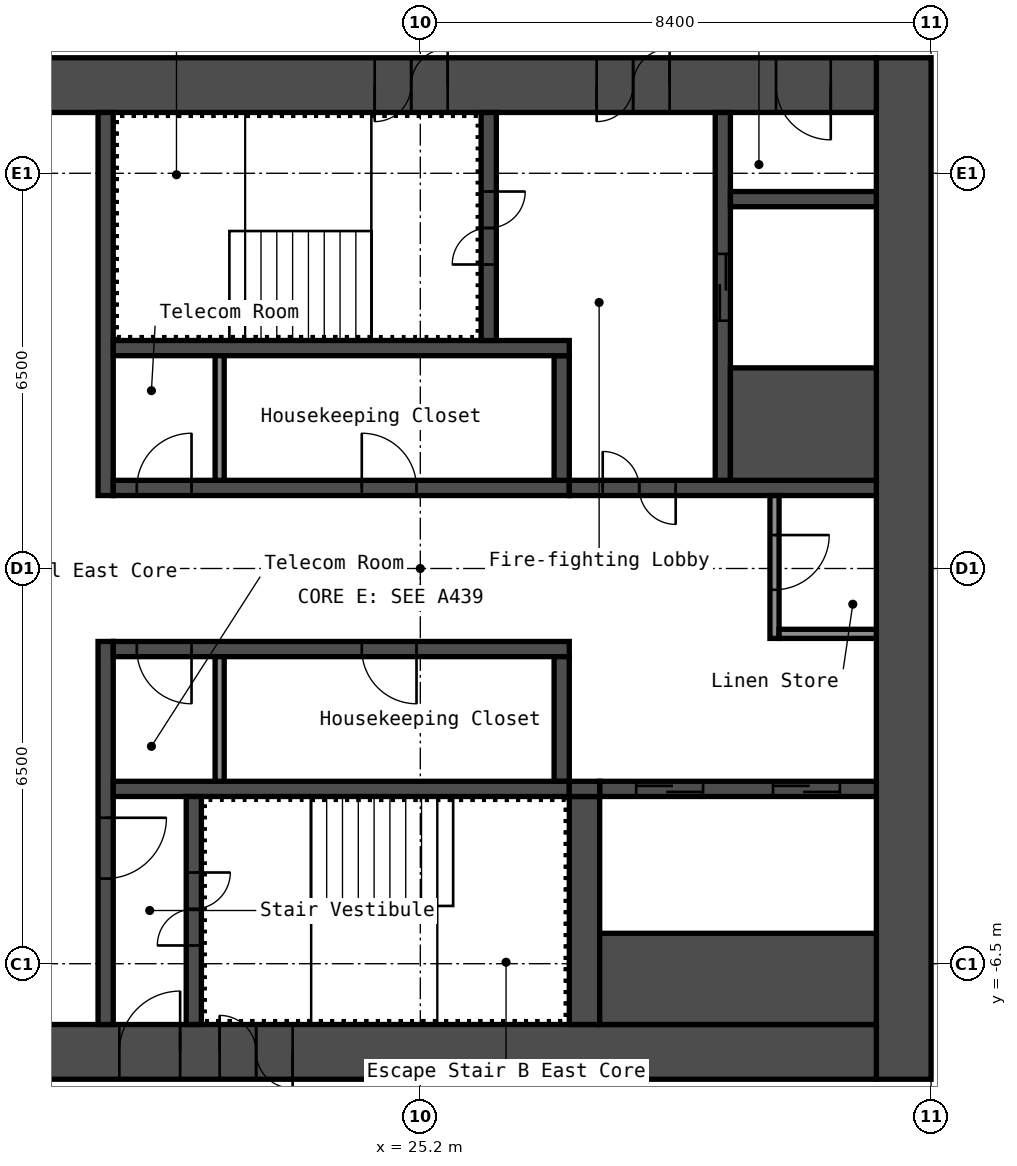
"""IFC4 building model, lengths in metres.
Left out: names, types, materials, properties, quantities, classifications, styles, units other than length and angle.
Written with IfcOpenShell. Run it as: python <this file> out.ifc"""

import sys

from ifc_helpers import new_model, si_unit, direction, frame, frame_2d, origin, place, context, subcontext, project, spatial, rectangle, extrude, element, fill, save


model = new_model("IFC4")
c1 = context("Model", 3, precision=1e-05, world=origin(), true_north=direction((0.0, 1.0)))
c2 = subcontext(c1, "Body", "Model", "MODEL_VIEW")
j1 = project(units=[si_unit("LENGTHUNIT", "METRE"), si_unit("PLANEANGLEUNIT", "RADIAN")], contexts=[c1])
p1 = place(None, origin())
s1 = spatial("IfcSite", under=j1, at=p1, CompositionType="ELEMENT")
p2 = place(p1, origin())
s2 = spatial("IfcBuilding", under=s1, at=p2, CompositionType="ELEMENT")
p3 = place(p2, frame((0.0, 0.0, 270.6)))
s3 = spatial("IfcBuildingStorey", under=s2, at=p3, CompositionType="ELEMENT", Elevation=270.6)
p4 = place(p3, frame((33.15, -8.4, 0.0), z_axis=(0.0, 0.0, 1.0), x_axis=(0.0, 1.0, 0.0)))
e1 = element("IfcWall", 1, at=p4, inside=s3, PredefinedType="SHEAR", context=c2, shape_type="SweptSolid", body=[
    extrude(rectangle(XDim=16.8, YDim=0.9, at=frame_2d((8.4, 0.0))), origin(), (0.0, 0.0, 1.0), 5.55),
])
p5 = place(p3, frame((17.7, 7.95, 0.0), z_axis=(0.0, 0.0, 1.0), x_axis=(1.0, 0.0, 0.0)))
e2 = element("IfcWall", 2, at=p5, inside=s3, PredefinedType="SHEAR", context=c2, shape_type="SweptSolid", body=[
    extrude(rectangle(XDim=15.0, YDim=0.9, at=frame_2d((7.5, 0.0))), origin(), (0.0, 0.0, 1.0), 5.55),
])
p6 = place(p5, frame((10.4, 0.0, 0.0)))
e3 = element("IfcOpeningElement", 3, at=p6, cuts=e2, PredefinedType="OPENING", context=c2, shape_type="SweptSolid", body=[
    extrude(rectangle(XDim=1.2, YDim=2.1, at=frame_2d((0.6, 1.05))), frame((0.0, 0.46, 0.0), z_axis=(0.0, -1.0, 0.0), x_axis=(1.0, 0.0, 0.0)), (0.0, 0.0, 1.0), 0.92),
])
p7 = place(p5, frame((13.35, 0.0, 0.0)))
e4 = element("IfcOpeningElement", 4, at=p7, cuts=e2, PredefinedType="OPENING", context=c2, shape_type="SweptSolid", body=[
    extrude(rectangle(XDim=0.9, YDim=2.1, at=frame_2d((0.45, 1.05))), frame((0.0, 0.46, 0.0), z_axis=(0.0, -1.0, 0.0), x_axis=(1.0, 0.0, 0.0)), (0.0, 0.0, 1.0), 0.92),
])
p8 = place(p5, frame((6.75, 0.0, 0.0)))
e5 = element("IfcOpeningElement", 5, at=p8, cuts=e2, PredefinedType="OPENING", context=c2, shape_type="SweptSolid", body=[
    extrude(rectangle(XDim=1.2, YDim=2.1, at=frame_2d((0.6, 1.05))), frame((0.0, 0.46, 0.0), z_axis=(0.0, -1.0, 0.0), x_axis=(1.0, 0.0, 0.0)), (0.0, 0.0, 1.0), 0.92),
])
p9 = place(p3, frame((17.7, -7.95, 0.0), z_axis=(0.0, 0.0, 1.0), x_axis=(1.0, 0.0, 0.0)))
e6 = element("IfcWall", 6, at=p9, inside=s3, PredefinedType="SHEAR", context=c2, shape_type="SweptSolid", body=[
    extrude(rectangle(XDim=15.0, YDim=0.9, at=frame_2d((7.5, 0.0))), origin(), (0.0, 0.0, 1.0), 5.55),
])
p10 = place(p9, frame((2.55, 0.0, 0.0)))
e7 = element("IfcOpeningElement", 7, at=p10, cuts=e6, PredefinedType="OPENING", context=c2, shape_type="SweptSolid", body=[
    extrude(rectangle(XDim=1.0, YDim=2.1, at=frame_2d((0.5, 1.05))), frame((0.0, 0.46, 0.0), z_axis=(0.0, -1.0, 0.0), x_axis=(1.0, 0.0, 0.0)), (0.0, 0.0, 1.0), 0.92),
])
p11 = place(p9, frame((4.2, 0.0, 0.0)))
e8 = element("IfcOpeningElement", 8, at=p11, cuts=e6, PredefinedType="OPENING", context=c2, shape_type="SweptSolid", body=[
    extrude(rectangle(XDim=1.2, YDim=2.1, at=frame_2d((0.6, 1.05))), frame((0.0, 0.46, 0.0), z_axis=(0.0, -1.0, 0.0), x_axis=(1.0, 0.0, 0.0)), (0.0, 0.0, 1.0), 0.92),
])
p12 = place(p3, frame((20.025, 1.2, 0.0), z_axis=(0.0, 0.0, 1.0), x_axis=(0.0, 1.0, 0.0)))
e9 = element("IfcWall", 9, at=p12, inside=s3, PredefinedType="SHEAR", context=c2, shape_type="SweptSolid", body=[
    extrude(rectangle(XDim=6.3, YDim=0.25, at=frame_2d((3.15, 0.0))), origin(), (0.0, 0.0, 1.0), 5.55),
])
p13 = place(p3, frame((20.025, -7.5, 0.0), z_axis=(0.0, 0.0, 1.0), x_axis=(0.0, 1.0, 0.0)))
e10 = element("IfcWall", 10, at=p13, inside=s3, PredefinedType="SHEAR", context=c2, shape_type="SweptSolid", body=[
    extrude(rectangle(XDim=6.3, YDim=0.25, at=frame_2d((3.15, 0.0))), origin(), (0.0, 0.0, 1.0), 5.55),
])
p14 = place(p13, frame((2.4, 0.0, 0.0)))
e11 = element("IfcOpeningElement", 11, at=p14, cuts=e10, PredefinedType="OPENING", context=c2, shape_type="SweptSolid", body=[
    extrude(rectangle(XDim=1.0, YDim=2.1, at=frame_2d((0.5, 1.05))), frame((0.0, 0.135, 0.0), z_axis=(0.0, -1.0, 0.0), x_axis=(1.0, 0.0, 0.0)), (0.0, 0.0, 1.0), 0.27),
])
p15 = place(p3, frame((20.15, 1.325, 0.0), z_axis=(0.0, 0.0, 1.0), x_axis=(1.0, 0.0, 0.0)))
e12 = element("IfcWall", 12, at=p15, inside=s3, PredefinedType="SHEAR", context=c2, shape_type="SweptSolid", body=[
    extrude(rectangle(XDim=7.5, YDim=0.25, at=frame_2d((3.75, 0.0))), origin(), (0.0, 0.0, 1.0), 5.55),
])
p16 = place(p15, frame((0.387, 0.0, 0.0)))
e13 = element("IfcOpeningElement", 13, at=p16, cuts=e12, PredefinedType="OPENING", context=c2, shape_type="SweptSolid", body=[
    extrude(rectangle(XDim=0.9, YDim=2.1, at=frame_2d((0.45, 1.05))), frame((0.0, 0.135, 0.0), z_axis=(0.0, -1.0, 0.0), x_axis=(1.0, 0.0, 0.0)), (0.0, 0.0, 1.0), 0.27),
])
p17 = place(p15, frame((4.087, 0.0, 0.0)))
e14 = element("IfcOpeningElement", 14, at=p17, cuts=e12, PredefinedType="OPENING", context=c2, shape_type="SweptSolid", body=[
    extrude(rectangle(XDim=0.9, YDim=2.1, at=frame_2d((0.45, 1.05))), frame((0.0, 0.135, 0.0), z_axis=(0.0, -1.0, 0.0), x_axis=(1.0, 0.0, 0.0)), (0.0, 0.0, 1.0), 0.27),
])
p18 = place(p3, frame((27.525, 1.45, 0.0), z_axis=(0.0, 0.0, 1.0), x_axis=(0.0, 1.0, 0.0)))
e15 = element("IfcWall", 15, at=p18, inside=s3, PredefinedType="SHEAR", context=c2, shape_type="SweptSolid", body=[
    extrude(rectangle(XDim=2.05, YDim=0.25, at=frame_2d((1.025, 0.0))), origin(), (0.0, 0.0, 1.0), 5.55),
])
p19 = place(p3, frame((20.15, 3.625, 0.0), z_axis=(0.0, 0.0, 1.0), x_axis=(1.0, 0.0, 0.0)))
e16 = element("IfcWall", 16, at=p19, inside=s3, PredefinedType="SHEAR", context=c2, shape_type="SweptSolid", body=[
    extrude(rectangle(XDim=7.5, YDim=0.25, at=frame_2d((3.75, 0.0))), origin(), (0.0, 0.0, 1.0), 5.55),
])
p20 = place(p3, frame((26.325, 3.75, 0.0), z_axis=(0.0, 0.0, 1.0), x_axis=(0.0, 1.0, 0.0)))
e17 = element("IfcWall", 17, at=p20, inside=s3, PredefinedType="SHEAR", context=c2, shape_type="SweptSolid", body=[
    extrude(rectangle(XDim=3.75, YDim=0.25, at=frame_2d((1.875, 0.0))), origin(), (0.0, 0.0, 1.0), 5.55),
])
p21 = place(p20, frame((1.25, 0.0, 0.0)))
e18 = element("IfcOpeningElement", 18, at=p21, cuts=e17, PredefinedType="OPENING", context=c2, shape_type="SweptSolid", body=[
    extrude(rectangle(XDim=1.2, YDim=2.1, at=frame_2d((0.6, 1.05))), frame((0.0, 0.135, 0.0), z_axis=(0.0, -1.0, 0.0), x_axis=(1.0, 0.0, 0.0)), (0.0, 0.0, 1.0), 0.27),
])
p22 = place(p3, frame((27.65, 1.325, 0.0), z_axis=(0.0, 0.0, 1.0), x_axis=(1.0, 0.0, 0.0)))
e19 = element("IfcWall", 19, at=p22, inside=s3, PredefinedType="SHEAR", context=c2, shape_type="SweptSolid", body=[
    extrude(rectangle(XDim=5.05, YDim=0.25, at=frame_2d((2.525, 0.0))), origin(), (0.0, 0.0, 1.0), 5.55),
])
p23 = place(p22, frame((0.55, 0.0, 0.0)))
e20 = element("IfcOpeningElement", 20, at=p23, cuts=e19, PredefinedType="OPENING", context=c2, shape_type="SweptSolid", body=[
    extrude(rectangle(XDim=1.2, YDim=2.1, at=frame_2d((0.6, 1.05))), frame((0.0, 0.135, 0.0), z_axis=(0.0, -1.0, 0.0), x_axis=(1.0, 0.0, 0.0)), (0.0, 0.0, 1.0), 0.27),
])
p24 = place(p3, frame((30.175, 1.45, 0.0), z_axis=(0.0, 0.0, 1.0), x_axis=(0.0, 1.0, 0.0)))
e21 = element("IfcWall", 21, at=p24, inside=s3, PredefinedType="SHEAR", context=c2, shape_type="SweptSolid", body=[
    extrude(rectangle(XDim=6.05, YDim=0.25, at=frame_2d((3.025, 0.0))), origin(), (0.0, 0.0, 1.0), 5.55),
])
p25 = place(p24, frame((2.625, 0.0, 0.0)))
e22 = element("IfcOpeningElement", 22, at=p25, cuts=e21, PredefinedType="OPENING", context=c2, shape_type="SweptSolid", body=[
    extrude(rectangle(XDim=1.1, YDim=2.1, at=frame_2d((0.55, 1.05))), frame((0.0, 0.135, 0.0), z_axis=(0.0, -1.0, 0.0), x_axis=(1.0, 0.0, 0.0)), (0.0, 0.0, 1.0), 0.27),
])
p26 = place(p3, frame((30.3, 2.375, 0.0), z_axis=(0.0, 0.0, 1.0), x_axis=(1.0, 0.0, 0.0)))
e23 = element("IfcWall", 23, at=p26, inside=s3, PredefinedType="SHEAR", context=c2, shape_type="SweptSolid", body=[
    extrude(rectangle(XDim=2.4, YDim=1.85, at=frame_2d((1.2, 0.0))), origin(), (0.0, 0.0, 1.0), 5.55),
])
p27 = place(p3, frame((30.3, 6.075, 0.0), z_axis=(0.0, 0.0, 1.0), x_axis=(1.0, 0.0, 0.0)))
e24 = element("IfcWall", 24, at=p27, inside=s3, PredefinedType="SHEAR", context=c2, shape_type="SweptSolid", body=[
    extrude(rectangle(XDim=2.4, YDim=0.25, at=frame_2d((1.2, 0.0))), origin(), (0.0, 0.0, 1.0), 5.55),
])
p28 = place(p3, frame((20.15, -1.325, 0.0), z_axis=(0.0, 0.0, 1.0), x_axis=(1.0, 0.0, 0.0)))
e25 = element("IfcWall", 25, at=p28, inside=s3, PredefinedType="SHEAR", context=c2, shape_type="SweptSolid", body=[
    extrude(rectangle(XDim=7.5, YDim=0.25, at=frame_2d((3.75, 0.0))), origin(), (0.0, 0.0, 1.0), 5.55),
])
p29 = place(p28, frame((0.387, 0.0, 0.0)))
e26 = element("IfcOpeningElement", 26, at=p29, cuts=e25, PredefinedType="OPENING", context=c2, shape_type="SweptSolid", body=[
    extrude(rectangle(XDim=0.9, YDim=2.1, at=frame_2d((0.45, 1.05))), frame((0.0, 0.135, 0.0), z_axis=(0.0, -1.0, 0.0), x_axis=(1.0, 0.0, 0.0)), (0.0, 0.0, 1.0), 0.27),
])
p30 = place(p28, frame((4.087, 0.0, 0.0)))
e27 = element("IfcOpeningElement", 27, at=p30, cuts=e25, PredefinedType="OPENING", context=c2, shape_type="SweptSolid", body=[
    extrude(rectangle(XDim=0.9, YDim=2.1, at=frame_2d((0.45, 1.05))), frame((0.0, 0.135, 0.0), z_axis=(0.0, -1.0, 0.0), x_axis=(1.0, 0.0, 0.0)), (0.0, 0.0, 1.0), 0.27),
])
p31 = place(p3, frame((27.525, -3.5, 0.0), z_axis=(0.0, 0.0, 1.0), x_axis=(0.0, 1.0, 0.0)))
e28 = element("IfcWall", 28, at=p31, inside=s3, PredefinedType="SHEAR", context=c2, shape_type="SweptSolid", body=[
    extrude(rectangle(XDim=2.05, YDim=0.25, at=frame_2d((1.025, 0.0))), origin(), (0.0, 0.0, 1.0), 5.55),
])
p32 = place(p3, frame((20.15, -3.625, 0.0), z_axis=(0.0, 0.0, 1.0), x_axis=(1.0, 0.0, 0.0)))
e29 = element("IfcWall", 29, at=p32, inside=s3, PredefinedType="SHEAR", context=c2, shape_type="SweptSolid", body=[
    extrude(rectangle(XDim=7.5, YDim=0.25, at=frame_2d((3.75, 0.0))), origin(), (0.0, 0.0, 1.0), 5.55),
])
p33 = place(p3, frame((21.475, -7.5, 0.0), z_axis=(0.0, 0.0, 1.0), x_axis=(0.0, 1.0, 0.0)))
e30 = element("IfcWall", 30, at=p33, inside=s3, PredefinedType="SHEAR", context=c2, shape_type="SweptSolid", body=[
    extrude(rectangle(XDim=3.75, YDim=0.25, at=frame_2d((1.875, 0.0))), origin(), (0.0, 0.0, 1.0), 5.55),
])
p34 = place(p33, frame((1.3, 0.0, 0.0)))
e31 = element("IfcOpeningElement", 31, at=p34, cuts=e30, PredefinedType="OPENING", context=c2, shape_type="SweptSolid", body=[
    extrude(rectangle(XDim=1.2, YDim=2.1, at=frame_2d((0.6, 1.05))), frame((0.0, 0.135, 0.0), z_axis=(0.0, -1.0, 0.0), x_axis=(1.0, 0.0, 0.0)), (0.0, 0.0, 1.0), 0.27),
])
p35 = place(p3, frame((27.9, -7.5, 0.0), z_axis=(0.0, 0.0, 1.0), x_axis=(0.0, 1.0, 0.0)))
e32 = element("IfcWall", 32, at=p35, inside=s3, PredefinedType="SHEAR", context=c2, shape_type="SweptSolid", body=[
    extrude(rectangle(XDim=3.75, YDim=0.5, at=frame_2d((1.875, 0.0))), origin(), (0.0, 0.0, 1.0), 5.55),
])
p36 = place(p3, frame((28.15, -3.625, 0.0), z_axis=(0.0, 0.0, 1.0), x_axis=(1.0, 0.0, 0.0)))
e33 = element("IfcWall", 33, at=p36, inside=s3, PredefinedType="SHEAR", context=c2, shape_type="SweptSolid", body=[
    extrude(rectangle(XDim=4.55, YDim=0.25, at=frame_2d((2.275, 0.0))), origin(), (0.0, 0.0, 1.0), 5.55),
])
p37 = place(p36, frame((0.6, 0.0, 0.0)))
e34 = element("IfcOpeningElement", 34, at=p37, cuts=e33, PredefinedType="OPENING", context=c2, shape_type="SweptSolid", body=[
    extrude(rectangle(XDim=1.1, YDim=2.1, at=frame_2d((0.55, 1.05))), frame((0.0, 0.135, 0.0), z_axis=(0.0, -1.0, 0.0), x_axis=(1.0, 0.0, 0.0)), (0.0, 0.0, 1.0), 0.27),
])
p38 = place(p36, frame((2.85, 0.0, 0.0)))
e35 = element("IfcOpeningElement", 35, at=p38, cuts=e33, PredefinedType="OPENING", context=c2, shape_type="SweptSolid", body=[
    extrude(rectangle(XDim=1.1, YDim=2.1, at=frame_2d((0.55, 1.05))), frame((0.0, 0.135, 0.0), z_axis=(0.0, -1.0, 0.0), x_axis=(1.0, 0.0, 0.0)), (0.0, 0.0, 1.0), 0.27),
])
p39 = place(p3, frame((28.15, -6.75, 0.0), z_axis=(0.0, 0.0, 1.0), x_axis=(1.0, 0.0, 0.0)))
e36 = element("IfcWall", 36, at=p39, inside=s3, PredefinedType="SHEAR", context=c2, shape_type="SweptSolid", body=[
    extrude(rectangle(XDim=4.55, YDim=1.5, at=frame_2d((2.275, 0.0))), origin(), (0.0, 0.0, 1.0), 5.55),
])
p40 = place(p3, frame((27.65, -3.625, 0.0), z_axis=(0.0, 0.0, 1.0), x_axis=(1.0, 0.0, 0.0)))
e37 = element("IfcWall", 37, at=p40, inside=s3, PredefinedType="SHEAR", context=c2, shape_type="SweptSolid", body=[
    extrude(rectangle(XDim=0.5, YDim=0.25, at=frame_2d((0.25, 0.0))), origin(), (0.0, 0.0, 1.0), 5.55),
])
p41 = place(p3, frame((31.025, -1.15, 0.0), z_axis=(0.0, 0.0, 1.0), x_axis=(0.0, 1.0, 0.0)))
e38 = element("IfcWall", 38, at=p41, inside=s3, PredefinedType="PARTITIONING", context=c2, shape_type="SweptSolid", body=[
    extrude(rectangle(XDim=2.35, YDim=0.15, at=frame_2d((1.175, 0.0))), origin(), (0.0, 0.0, 1.0), 5.55),
])
p42 = place(p41, frame((0.8, 0.0, 0.0)))
e39 = element("IfcOpeningElement", 39, at=p42, cuts=e38, PredefinedType="OPENING", context=c2, shape_type="SweptSolid", body=[
    extrude(rectangle(XDim=0.9, YDim=2.1, at=frame_2d((0.45, 1.05))), frame((0.0, 0.085, 0.0), z_axis=(0.0, -1.0, 0.0), x_axis=(1.0, 0.0, 0.0)), (0.0, 0.0, 1.0), 0.17),
])
p43 = place(p3, frame((31.1, -1.075, 0.0), z_axis=(0.0, 0.0, 1.0), x_axis=(1.0, 0.0, 0.0)))
e40 = element("IfcWall", 40, at=p43, inside=s3, PredefinedType="PARTITIONING", context=c2, shape_type="SweptSolid", body=[
    extrude(rectangle(XDim=1.6, YDim=0.15, at=frame_2d((0.8, 0.0))), origin(), (0.0, 0.0, 1.0), 5.55),
])
for number, where, z_axis, x_axis in (
    (41, (21.9, 1.45, 0.0), (0.0, 0.0, 1.0), (0.0, 1.0, 0.0)),
    (42, (21.9, -3.5, 0.0), (0.0, 0.0, 1.0), (0.0, 1.0, 0.0)),
):
    element("IfcWall", number, at=place(p3, frame(where, z_axis=z_axis, x_axis=x_axis)), inside=s3, PredefinedType="PARTITIONING", context=c2, shape_type="SweptSolid", body=[
        extrude(rectangle(XDim=2.05, YDim=0.15, at=frame_2d((1.025, 0.0))), origin(), (0.0, 0.0, 1.0), 5.55),
    ])
p44 = place(p6, origin())
e43 = element("IfcDoor", 43, at=p44, inside=s3, OperationType="DOUBLE_DOOR_SINGLE_SWING", PredefinedType="DOOR", context=c2, shape_type="SweptSolid", body=[
    extrude(rectangle(XDim=1.2, YDim=2.1, at=frame_2d((0.6, 1.05))), frame((0.0, 0.025, 0.0), z_axis=(0.0, -1.0, 0.0), x_axis=(1.0, 0.0, 0.0)), (0.0, 0.0, 1.0), 0.05),
])
fill(e3, e43)
p45 = place(p7, origin())
e44 = element("IfcDoor", 44, at=p45, inside=s3, OperationType="SINGLE_SWING_RIGHT", PredefinedType="DOOR", context=c2, shape_type="SweptSolid", body=[
    extrude(rectangle(XDim=0.9, YDim=2.1, at=frame_2d((0.45, 1.05))), frame((0.0, 0.025, 0.0), z_axis=(0.0, -1.0, 0.0), x_axis=(1.0, 0.0, 0.0)), (0.0, 0.0, 1.0), 0.05),
])
fill(e4, e44)
p46 = place(p10, origin())
e45 = element("IfcDoor", 45, at=p46, inside=s3, OperationType="SINGLE_SWING_LEFT", PredefinedType="DOOR", context=c2, shape_type="SweptSolid", body=[
    extrude(rectangle(XDim=1.0, YDim=2.1, at=frame_2d((0.5, 1.05))), frame((0.0, 0.025, 0.0), z_axis=(0.0, -1.0, 0.0), x_axis=(1.0, 0.0, 0.0)), (0.0, 0.0, 1.0), 0.05),
])
fill(e7, e45)
p47 = place(p8, origin())
e46 = element("IfcDoor", 46, at=p47, inside=s3, OperationType="DOUBLE_DOOR_SINGLE_SWING", PredefinedType="DOOR", context=c2, shape_type="SweptSolid", body=[
    extrude(rectangle(XDim=1.2, YDim=2.1, at=frame_2d((0.6, 1.05))), frame((0.0, 0.025, 0.0), z_axis=(0.0, -1.0, 0.0), x_axis=(1.0, 0.0, 0.0)), (0.0, 0.0, 1.0), 0.05),
])
fill(e5, e46)
p48 = place(p11, origin())
e47 = element("IfcDoor", 47, at=p48, inside=s3, OperationType="DOUBLE_DOOR_SINGLE_SWING", PredefinedType="DOOR", context=c2, shape_type="SweptSolid", body=[
    extrude(rectangle(XDim=1.2, YDim=2.1, at=frame_2d((0.6, 1.05))), frame((0.0, 0.025, 0.0), z_axis=(0.0, -1.0, 0.0), x_axis=(1.0, 0.0, 0.0)), (0.0, 0.0, 1.0), 0.05),
])
fill(e8, e47)
p49 = place(p21, origin())
e48 = element("IfcDoor", 48, at=p49, inside=s3, OperationType="DOUBLE_DOOR_SINGLE_SWING", PredefinedType="DOOR", context=c2, shape_type="SweptSolid", body=[
    extrude(rectangle(XDim=1.2, YDim=2.1, at=frame_2d((0.6, 1.05))), frame((0.0, 0.025, 0.0), z_axis=(0.0, -1.0, 0.0), x_axis=(1.0, 0.0, 0.0)), (0.0, 0.0, 1.0), 0.05),
])
fill(e18, e48)
p50 = place(p34, origin())
e49 = element("IfcDoor", 49, at=p50, inside=s3, OperationType="DOUBLE_DOOR_SINGLE_SWING", PredefinedType="DOOR", context=c2, shape_type="SweptSolid", body=[
    extrude(rectangle(XDim=1.2, YDim=2.1, at=frame_2d((0.6, 1.05))), frame((0.0, 0.025, 0.0), z_axis=(0.0, -1.0, 0.0), x_axis=(1.0, 0.0, 0.0)), (0.0, 0.0, 1.0), 0.05),
])
fill(e31, e49)
p51 = place(p14, origin())
e50 = element("IfcDoor", 50, at=p51, inside=s3, OperationType="SINGLE_SWING_RIGHT", PredefinedType="DOOR", context=c2, shape_type="SweptSolid", body=[
    extrude(rectangle(XDim=1.0, YDim=2.1, at=frame_2d((0.5, 1.05))), frame((0.0, 0.025, 0.0), z_axis=(0.0, -1.0, 0.0), x_axis=(1.0, 0.0, 0.0)), (0.0, 0.0, 1.0), 0.05),
])
fill(e11, e50)
p52 = place(p23, origin())
e51 = element("IfcDoor", 51, at=p52, inside=s3, OperationType="DOUBLE_DOOR_SINGLE_SWING", PredefinedType="DOOR", context=c2, shape_type="SweptSolid", body=[
    extrude(rectangle(XDim=1.2, YDim=2.1, at=frame_2d((0.6, 1.05))), frame((0.0, 0.025, 0.0), z_axis=(0.0, -1.0, 0.0), x_axis=(1.0, 0.0, 0.0)), (0.0, 0.0, 1.0), 0.05),
])
fill(e20, e51)
p53 = place(p42, origin())
e52 = element("IfcDoor", 52, at=p53, inside=s3, OperationType="SINGLE_SWING_RIGHT", PredefinedType="DOOR", context=c2, shape_type="SweptSolid", body=[
    extrude(rectangle(XDim=0.9, YDim=2.1, at=frame_2d((0.45, 1.05))), frame((0.0, 0.025, 0.0), z_axis=(0.0, -1.0, 0.0), x_axis=(1.0, 0.0, 0.0)), (0.0, 0.0, 1.0), 0.05),
])
fill(e39, e52)
p54 = place(p16, origin())
e53 = element("IfcDoor", 53, at=p54, inside=s3, OperationType="SINGLE_SWING_LEFT", PredefinedType="DOOR", context=c2, shape_type="SweptSolid", body=[
    extrude(rectangle(XDim=0.9, YDim=2.1, at=frame_2d((0.45, 1.05))), frame((0.0, 0.025, 0.0), z_axis=(0.0, -1.0, 0.0), x_axis=(1.0, 0.0, 0.0)), (0.0, 0.0, 1.0), 0.05),
])
fill(e13, e53)
p55 = place(p17, origin())
e54 = element("IfcDoor", 54, at=p55, inside=s3, OperationType="SINGLE_SWING_RIGHT", PredefinedType="DOOR", context=c2, shape_type="SweptSolid", body=[
    extrude(rectangle(XDim=0.9, YDim=2.1, at=frame_2d((0.45, 1.05))), frame((0.0, 0.025, 0.0), z_axis=(0.0, -1.0, 0.0), x_axis=(1.0, 0.0, 0.0)), (0.0, 0.0, 1.0), 0.05),
])
fill(e14, e54)
p56 = place(p29, origin())
e55 = element("IfcDoor", 55, at=p56, inside=s3, OperationType="SINGLE_SWING_RIGHT", PredefinedType="DOOR", context=c2, shape_type="SweptSolid", body=[
    extrude(rectangle(XDim=0.9, YDim=2.1, at=frame_2d((0.45, 1.05))), frame((0.0, 0.025, 0.0), z_axis=(0.0, -1.0, 0.0), x_axis=(1.0, 0.0, 0.0)), (0.0, 0.0, 1.0), 0.05),
])
fill(e26, e55)
p57 = place(p30, origin())
e56 = element("IfcDoor", 56, at=p57, inside=s3, OperationType="SINGLE_SWING_RIGHT", PredefinedType="DOOR", context=c2, shape_type="SweptSolid", body=[
    extrude(rectangle(XDim=0.9, YDim=2.1, at=frame_2d((0.45, 1.05))), frame((0.0, 0.025, 0.0), z_axis=(0.0, -1.0, 0.0), x_axis=(1.0, 0.0, 0.0)), (0.0, 0.0, 1.0), 0.05),
])
fill(e27, e56)
p58 = place(p25, origin())
e57 = element("IfcDoor", 57, at=p58, inside=s3, OperationType="DOUBLE_DOOR_SLIDING", PredefinedType="DOOR", context=c2, shape_type="SweptSolid", body=[
    extrude(rectangle(XDim=1.1, YDim=2.1, at=frame_2d((0.55, 1.05))), frame((0.0, 0.025, 0.0), z_axis=(0.0, -1.0, 0.0), x_axis=(1.0, 0.0, 0.0)), (0.0, 0.0, 1.0), 0.05),
])
fill(e22, e57)
p59 = place(p37, origin())
e58 = element("IfcDoor", 58, at=p59, inside=s3, OperationType="DOUBLE_DOOR_SLIDING", PredefinedType="DOOR", context=c2, shape_type="SweptSolid", body=[
    extrude(rectangle(XDim=1.1, YDim=2.1, at=frame_2d((0.55, 1.05))), frame((0.0, 0.025, 0.0), z_axis=(0.0, -1.0, 0.0), x_axis=(1.0, 0.0, 0.0)), (0.0, 0.0, 1.0), 0.05),
])
fill(e34, e58)
p60 = place(p38, origin())
e59 = element("IfcDoor", 59, at=p60, inside=s3, OperationType="DOUBLE_DOOR_SLIDING", PredefinedType="DOOR", context=c2, shape_type="SweptSolid", body=[
    extrude(rectangle(XDim=1.1, YDim=2.1, at=frame_2d((0.55, 1.05))), frame((0.0, 0.025, 0.0), z_axis=(0.0, -1.0, 0.0), x_axis=(1.0, 0.0, 0.0)), (0.0, 0.0, 1.0), 0.05),
])
fill(e35, e59)
save(model, sys.argv[1])
